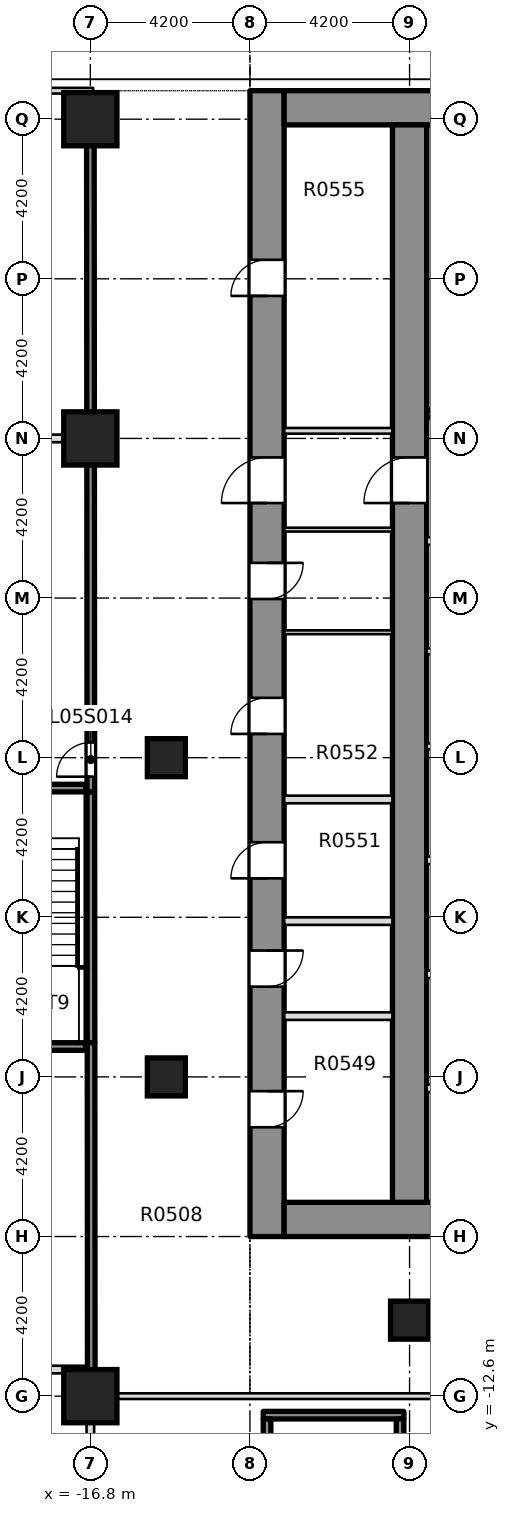
"""IFC4 building model, lengths in metres.
Left out: names, types, materials, properties, quantities, classifications, styles, units other than length and angle.
Written with IfcOpenShell. Run it as: python <this file> out.ifc"""

import sys

from ifc_helpers import new_model, si_unit, direction, frame, frame_2d, origin, origin_2d, place, context, subcontext, project, spatial, rectangle, extrude, element, fill, save


model = new_model("IFC4")
c1 = context("Model", 3, precision=1e-05, world=origin(), true_north=direction((0.0, 1.0)))
c2 = subcontext(c1, "Body", "Model", "MODEL_VIEW")
j1 = project(units=[si_unit("LENGTHUNIT", "METRE"), si_unit("PLANEANGLEUNIT", "RADIAN")], contexts=[c1])
p1 = place(None, origin())
s1 = spatial("IfcSite", under=j1, at=p1, CompositionType="ELEMENT")
p2 = place(p1, origin())
s2 = spatial("IfcBuilding", under=s1, at=p2, CompositionType="ELEMENT")
p3 = place(p2, frame((0.0, 0.0, 30.0)))
s3 = spatial("IfcBuildingStorey", under=s2, at=p3, CompositionType="ELEMENT", Elevation=30.0)
p4 = place(p3, frame((-12.15, -8.4, -0.4), z_axis=(0.0, 0.0, 1.0), x_axis=(0.0, 1.0, 0.0)))
e1 = element("IfcWall", 1, at=p4, inside=s3, PredefinedType="SHEAR", context=c2, shape_type="SweptSolid", body=[
    extrude(rectangle(XDim=30.15, YDim=0.9, at=frame_2d((15.075, 0.0))), origin(), (0.0, 0.0, 1.0), 4.58),
])
p5 = place(p4, frame((2.875, 0.0, 0.4)))
e2 = element("IfcOpeningElement", 2, at=p5, cuts=e1, PredefinedType="OPENING", context=c2, shape_type="SweptSolid", body=[
    extrude(rectangle(XDim=0.95, YDim=2.1, at=frame_2d((0.475, 1.05))), frame((0.0, 0.46, 0.0), z_axis=(0.0, -1.0, 0.0), x_axis=(1.0, 0.0, 0.0)), (0.0, 0.0, 1.0), 0.92),
])
p6 = place(p4, frame((6.575, 0.0, 0.4)))
e3 = element("IfcOpeningElement", 3, at=p6, cuts=e1, PredefinedType="OPENING", context=c2, shape_type="SweptSolid", body=[
    extrude(rectangle(XDim=0.95, YDim=2.1, at=frame_2d((0.475, 1.05))), frame((0.0, 0.46, 0.0), z_axis=(0.0, -1.0, 0.0), x_axis=(1.0, 0.0, 0.0)), (0.0, 0.0, 1.0), 0.92),
])
p7 = place(p4, frame((9.425, 0.0, 0.4)))
e4 = element("IfcOpeningElement", 4, at=p7, cuts=e1, PredefinedType="OPENING", context=c2, shape_type="SweptSolid", body=[
    extrude(rectangle(XDim=0.95, YDim=2.1, at=frame_2d((0.475, 1.05))), frame((0.0, 0.46, 0.0), z_axis=(0.0, -1.0, 0.0), x_axis=(1.0, 0.0, 0.0)), (0.0, 0.0, 1.0), 0.92),
])
p8 = place(p4, frame((13.225, 0.0, 0.4)))
e5 = element("IfcOpeningElement", 5, at=p8, cuts=e1, PredefinedType="OPENING", context=c2, shape_type="SweptSolid", body=[
    extrude(rectangle(XDim=0.95, YDim=2.1, at=frame_2d((0.475, 1.05))), frame((0.0, 0.46, 0.0), z_axis=(0.0, -1.0, 0.0), x_axis=(1.0, 0.0, 0.0)), (0.0, 0.0, 1.0), 0.92),
])
p9 = place(p4, frame((16.775, 0.0, 0.4)))
e6 = element("IfcOpeningElement", 6, at=p9, cuts=e1, PredefinedType="OPENING", context=c2, shape_type="SweptSolid", body=[
    extrude(rectangle(XDim=0.95, YDim=2.1, at=frame_2d((0.475, 1.05))), frame((0.0, 0.46, 0.0), z_axis=(0.0, -1.0, 0.0), x_axis=(1.0, 0.0, 0.0)), (0.0, 0.0, 1.0), 0.92),
])
p10 = place(p4, frame((24.75, 0.0, 0.4)))
e7 = element("IfcOpeningElement", 7, at=p10, cuts=e1, PredefinedType="OPENING", context=c2, shape_type="SweptSolid", body=[
    extrude(rectangle(XDim=0.95, YDim=2.1, at=frame_2d((0.475, 1.05))), frame((0.0, 0.46, 0.0), z_axis=(0.0, -1.0, 0.0), x_axis=(1.0, 0.0, 0.0)), (0.0, 0.0, 1.0), 0.92),
])
p11 = place(p4, frame((19.3, 0.0, 0.4)))
e8 = element("IfcOpeningElement", 8, at=p11, cuts=e1, PredefinedType="OPENING", context=c2, shape_type="SweptSolid", body=[
    extrude(rectangle(XDim=1.2, YDim=2.1, at=frame_2d((0.6, 1.05))), frame((0.0, 0.46, 0.0), z_axis=(0.0, -1.0, 0.0), x_axis=(1.0, 0.0, 0.0)), (0.0, 0.0, 1.0), 0.92),
])
p12 = place(p3, frame((-11.7, -7.95, -0.4), z_axis=(0.0, 0.0, 1.0), x_axis=(1.0, 0.0, 0.0)))
e9 = element("IfcWall", 9, at=p12, inside=s3, PredefinedType="SHEAR", context=c2, shape_type="SweptSolid", body=[
    extrude(rectangle(XDim=23.4, YDim=0.9, at=frame_2d((11.7, 0.0))), origin(), (0.0, 0.0, 1.0), 4.58),
])
p13 = place(p12, frame((6.95, 0.0, 0.4)))
e10 = element("IfcOpeningElement", 10, at=p13, cuts=e9, PredefinedType="OPENING", context=c2, shape_type="SweptSolid", body=[
    extrude(rectangle(XDim=1.8, YDim=2.1, at=frame_2d((0.9, 1.05))), frame((0.0, 0.46, 0.0), z_axis=(0.0, -1.0, 0.0), x_axis=(1.0, 0.0, 0.0)), (0.0, 0.0, 1.0), 0.92),
])
p14 = place(p12, frame((14.65, 0.0, 0.4)))
e11 = element("IfcOpeningElement", 11, at=p14, cuts=e9, PredefinedType="OPENING", context=c2, shape_type="SweptSolid", body=[
    extrude(rectangle(XDim=1.8, YDim=2.1, at=frame_2d((0.9, 1.05))), frame((0.0, 0.46, 0.0), z_axis=(0.0, -1.0, 0.0), x_axis=(1.0, 0.0, 0.0)), (0.0, 0.0, 1.0), 0.92),
])
p15 = place(p3, frame((-11.7, 21.3, -0.4), z_axis=(0.0, 0.0, 1.0), x_axis=(1.0, 0.0, 0.0)))
e12 = element("IfcWall", 12, at=p15, inside=s3, PredefinedType="SOLIDWALL", context=c2, shape_type="SweptSolid", body=[
    extrude(rectangle(XDim=23.4, YDim=0.9, at=frame_2d((11.7, 0.0))), origin(), (0.0, 0.0, 1.0), 4.58),
])
p16 = place(p3, frame((-8.4, -7.5, -0.4), z_axis=(0.0, 0.0, 1.0), x_axis=(0.0, 1.0, 0.0)))
e13 = element("IfcWall", 13, at=p16, inside=s3, PredefinedType="SHEAR", context=c2, shape_type="SweptSolid", body=[
    extrude(rectangle(XDim=28.35, YDim=0.9, at=frame_2d((14.175, 0.0))), origin(), (0.0, 0.0, 1.0), 4.58),
])
p17 = place(p16, frame((18.4, 0.0, 0.4)))
e14 = element("IfcOpeningElement", 14, at=p17, cuts=e13, PredefinedType="OPENING", context=c2, shape_type="SweptSolid", body=[
    extrude(rectangle(XDim=1.2, YDim=2.1, at=frame_2d((0.6, 1.05))), frame((0.0, 0.46, 0.0), z_axis=(0.0, -1.0, 0.0), x_axis=(1.0, 0.0, 0.0)), (0.0, 0.0, 1.0), 0.92),
])
for number, where, z_axis, x_axis in (
    (15, (-16.8, -12.6, -0.4), (0.0, 0.0, 1.0), (1.0, 0.0, 0.0)),
    (16, (-16.8, 12.6, -0.4), (0.0, 0.0, 1.0), (1.0, 0.0, 0.0)),
    (17, (-16.8, 21.0, -0.4), (0.0, 0.0, 1.0), (1.0, 0.0, 0.0)),
):
    element("IfcColumn", number, at=place(p3, frame(where, z_axis=z_axis, x_axis=x_axis)), inside=s3, PredefinedType="COLUMN", context=c2, shape_type="SweptSolid", body=[
        extrude(rectangle(XDim=1.4, YDim=1.4, at=origin_2d()), origin(), (0.0, 0.0, 1.0), 4.58),
    ])
for number, where, z_axis, x_axis in (
    (18, (-8.4, -10.6, -0.4), (0.0, 0.0, 1.0), (1.0, 0.0, 0.0)),
    (19, (-14.8, -4.2, -0.4), (0.0, 0.0, 1.0), (1.0, 0.0, 0.0)),
    (20, (-14.8, 4.2, -0.4), (0.0, 0.0, 1.0), (1.0, 0.0, 0.0)),
):
    element("IfcColumn", number, at=place(p3, frame(where, z_axis=z_axis, x_axis=x_axis)), inside=s3, PredefinedType="COLUMN", context=c2, shape_type="SweptSolid", body=[
        extrude(rectangle(XDim=1.0, YDim=1.0, at=origin_2d()), origin(), (0.0, 0.0, 1.0), 4.58),
    ])
p18 = place(p3, frame((-16.9, -12.6, 0.0), z_axis=(0.0, 0.0, 1.0), x_axis=(1.0, 0.0, 0.0)))
e21 = element("IfcWall", 21, at=p18, inside=s3, PredefinedType="PARTITIONING", context=c2, shape_type="SweptSolid", body=[
    extrude(rectangle(XDim=9.625, YDim=0.15, at=frame_2d((4.812, 0.0))), origin(), (0.0, 0.0, 1.0), 4.18),
])
for number, where, z_axis, x_axis in (
    (22, (-25.75, -11.9, 0.0), (0.0, 0.0, 1.0), (1.0, 0.0, 0.0)),
    (23, (-25.75, 12.6, 0.0), (0.0, 0.0, 1.0), (1.0, 0.0, 0.0)),
):
    element("IfcWall", number, at=place(p3, frame(where, z_axis=z_axis, x_axis=x_axis)), inside=s3, PredefinedType="PARTITIONING", context=c2, shape_type="SweptSolid", body=[
        extrude(rectangle(XDim=8.875, YDim=0.2, at=frame_2d((4.438, 0.0))), origin(), (0.0, 0.0, 1.0), 4.18),
    ])
p19 = place(p3, frame((-25.75, 21.75, 0.0), z_axis=(0.0, 0.0, 1.0), x_axis=(1.0, 0.0, 0.0)))
e24 = element("IfcWall", 24, at=p19, inside=s3, PredefinedType="PARTITIONING", context=c2, shape_type="SweptSolid", body=[
    extrude(rectangle(XDim=9.025, YDim=0.15, at=frame_2d((4.512, 0.0))), origin(), (0.0, 0.0, 1.0), 4.18),
])
p20 = place(p19, frame((1.55, 0.0, 0.0)))
e25 = element("IfcOpeningElement", 25, at=p20, cuts=e24, PredefinedType="OPENING", context=c2, shape_type="SweptSolid", body=[
    extrude(rectangle(XDim=0.9, YDim=2.1, at=frame_2d((0.45, 1.05))), frame((0.0, 0.085, 0.0), z_axis=(0.0, -1.0, 0.0), x_axis=(1.0, 0.0, 0.0)), (0.0, 0.0, 1.0), 0.17),
])
p21 = place(p19, frame((6.025, 0.0, 0.0)))
e26 = element("IfcOpeningElement", 26, at=p21, cuts=e24, PredefinedType="OPENING", context=c2, shape_type="SweptSolid", body=[
    extrude(rectangle(XDim=0.9, YDim=2.1, at=frame_2d((0.45, 1.05))), frame((0.0, 0.085, 0.0), z_axis=(0.0, -1.0, 0.0), x_axis=(1.0, 0.0, 0.0)), (0.0, 0.0, 1.0), 0.17),
])
p22 = place(p3, frame((-16.8, -18.125, 0.0), z_axis=(0.0, 0.0, 1.0), x_axis=(0.0, 1.0, 0.0)))
e27 = element("IfcWall", 27, at=p22, inside=s3, PredefinedType="PARTITIONING", context=c2, shape_type="SweptSolid", body=[
    extrude(rectangle(XDim=5.45, YDim=0.2, at=frame_2d((2.725, 0.0))), origin(), (0.0, 0.0, 1.0), 4.18),
])
p23 = place(p3, frame((-16.782, -3.3, 0.0), z_axis=(0.0, 0.0, 1.0), x_axis=(-0.000739808927, 0.999999726341, 0.0)))
e28 = element("IfcWall", 28, at=p23, inside=s3, PredefinedType="SOLIDWALL", context=c2, shape_type="SweptSolid", body=[
    extrude(rectangle(XDim=6.6, YDim=0.2, at=frame_2d((3.3, 0.0))), origin(), (0.0, 0.0, 1.0), 4.18),
])
for number, where, z_axis, x_axis in (
    (29, (-7.949, -4.5, 0.0), (0.0, 0.0, 1.0), (1.0, 0.0, 0.0)),
    (30, (-7.949, -1.5, 0.0), (0.0, 0.0, 1.0), (1.0, 0.0, 0.0)),
    (31, (-7.949, 1.5, 0.0), (0.0, 0.0, 1.0), (1.0, 0.0, 0.0)),
):
    element("IfcWall", number, at=place(p3, frame(where, z_axis=z_axis, x_axis=x_axis)), inside=s3, PredefinedType="PARTITIONING", context=c2, shape_type="SweptSolid", body=[
        extrude(rectangle(XDim=2.374, YDim=0.2, at=frame_2d((1.187, 0.0))), origin(), (0.0, 0.0, 1.0), 4.18),
    ])
p24 = place(p3, frame((-7.949, 4.5, 0.0), z_axis=(0.0, 0.0, 1.0), x_axis=(1.0, 0.0, 0.0)))
e32 = element("IfcWall", 32, at=p24, inside=s3, PredefinedType="PARTITIONING", context=c2, shape_type="SweptSolid", body=[
    extrude(rectangle(XDim=2.524, YDim=0.15, at=frame_2d((1.262, 0.0))), origin(), (0.0, 0.0, 1.0), 4.18),
])
p25 = place(p3, frame((-7.949, 7.0, 0.0), z_axis=(0.0, 0.0, 1.0), x_axis=(1.0, 0.0, 0.0)))
e33 = element("IfcWall", 33, at=p25, inside=s3, PredefinedType="PARTITIONING", context=c2, shape_type="SweptSolid", body=[
    extrude(rectangle(XDim=15.898, YDim=0.15, at=frame_2d((7.949, 0.0))), origin(), (0.0, 0.0, 1.0), 4.18),
])
p26 = place(p25, frame((7.249, 0.0, 0.0)))
e34 = element("IfcOpeningElement", 34, at=p26, cuts=e33, PredefinedType="OPENING", context=c2, shape_type="SweptSolid", body=[
    extrude(rectangle(XDim=1.4, YDim=2.1, at=frame_2d((0.7, 1.05))), frame((0.0, 0.085, 0.0), z_axis=(0.0, -1.0, 0.0), x_axis=(1.0, 0.0, 0.0)), (0.0, 0.0, 1.0), 0.17),
])
p27 = place(p3, frame((-7.949, 9.9, 0.0), z_axis=(0.0, 0.0, 1.0), x_axis=(1.0, 0.0, 0.0)))
e35 = element("IfcWall", 35, at=p27, inside=s3, PredefinedType="PARTITIONING", context=c2, shape_type="SweptSolid", body=[
    extrude(rectangle(XDim=4.349, YDim=0.2, at=frame_2d((2.174, 0.0))), origin(), (0.0, 0.0, 1.0), 4.18),
])
p28 = place(p27, frame((0.999, 0.0, 0.0)))
e36 = element("IfcOpeningElement", 36, at=p28, cuts=e35, PredefinedType="OPENING", context=c2, shape_type="SweptSolid", body=[
    extrude(rectangle(XDim=1.1, YDim=2.1, at=frame_2d((0.55, 1.05))), frame((0.0, 0.11, 0.0), z_axis=(0.0, -1.0, 0.0), x_axis=(1.0, 0.0, 0.0)), (0.0, 0.0, 1.0), 0.22),
])
p29 = place(p3, frame((-7.949, 13.25, 0.0), z_axis=(0.0, 0.0, 1.0), x_axis=(1.0, 0.0, 0.0)))
e37 = element("IfcWall", 37, at=p29, inside=s3, PredefinedType="SOLIDWALL", context=c2, shape_type="SweptSolid", body=[
    extrude(rectangle(XDim=4.524, YDim=0.2, at=frame_2d((2.262, 0.0))), origin(), (0.0, 0.0, 1.0), 4.18),
])
p30 = place(p29, frame((1.499, 0.0, 0.0)))
e38 = element("IfcOpeningElement", 38, at=p30, cuts=e37, PredefinedType="OPENING", context=c2, shape_type="SweptSolid", body=[
    extrude(rectangle(XDim=1.2, YDim=2.1, at=frame_2d((0.6, 1.05))), frame((0.0, 0.11, 0.0), z_axis=(0.0, -1.0, 0.0), x_axis=(1.0, 0.0, 0.0)), (0.0, 0.0, 1.0), 0.22),
])
for number, where, z_axis, x_axis in (
    (39, (-11.699, -2.6, 0.0), (0.0, 0.0, 1.0), (1.0, 0.0, 0.0)),
    (40, (-11.699, -0.1, 0.0), (0.0, 0.0, 1.0), (1.0, 0.0, 0.0)),
    (41, (-11.699, 3.1, 0.0), (0.0, 0.0, 1.0), (1.0, 0.0, 0.0)),
):
    element("IfcWall", number, at=place(p3, frame(where, z_axis=z_axis, x_axis=x_axis)), inside=s3, PredefinedType="PARTITIONING", context=c2, shape_type="SweptSolid", body=[
        extrude(rectangle(XDim=2.848, YDim=0.2, at=frame_2d((1.424, 0.0))), origin(), (0.0, 0.0, 1.0), 4.18),
    ])
for number, where, z_axis, x_axis in (
    (42, (-11.699, 7.5, 0.0), (0.0, 0.0, 1.0), (1.0, 0.0, 0.0)),
    (43, (-11.699, 10.2, 0.0), (0.0, 0.0, 1.0), (1.0, 0.0, 0.0)),
):
    element("IfcWall", number, at=place(p3, frame(where, z_axis=z_axis, x_axis=x_axis)), inside=s3, PredefinedType="PARTITIONING", context=c2, shape_type="SweptSolid", body=[
        extrude(rectangle(XDim=2.848, YDim=0.1, at=frame_2d((1.424, 0.0))), origin(), (0.0, 0.0, 1.0), 4.18),
    ])
p31 = place(p3, frame((-11.699, 12.8, 0.0), z_axis=(0.0, 0.0, 1.0), x_axis=(1.0, 0.0, 0.0)))
e44 = element("IfcWall", 44, at=p31, inside=s3, PredefinedType="PARTITIONING", context=c2, shape_type="SweptSolid", body=[
    extrude(rectangle(XDim=2.848, YDim=0.15, at=frame_2d((1.424, 0.0))), origin(), (0.0, 0.0, 1.0), 4.18),
])
p32 = place(p3, frame((-12.25, -13.1, 0.0), z_axis=(0.0, 0.0, 1.0), x_axis=(1.0, 0.0, 0.0)))
e45 = element("IfcWall", 45, at=p32, inside=s3, PredefinedType="SOLIDWALL", context=c2, shape_type="SweptSolid", body=[
    extrude(rectangle(XDim=3.7, YDim=0.2, at=frame_2d((1.85, 0.0))), origin(), (0.0, 0.0, 1.0), 4.18),
])
p33 = place(p3, frame((-12.15, -19.8, 0.0), z_axis=(0.0, 0.0, 1.0), x_axis=(0.0, 1.0, 0.0)))
e46 = element("IfcWall", 46, at=p33, inside=s3, PredefinedType="SOLIDWALL", context=c2, shape_type="SweptSolid", body=[
    extrude(rectangle(XDim=6.6, YDim=0.2, at=frame_2d((3.3, 0.0))), origin(), (0.0, 0.0, 1.0), 4.18),
])
p34 = place(p3, frame((-8.65, -20.3, 0.0), z_axis=(0.0, 0.0, 1.0), x_axis=(0.0, 1.0, 0.0)))
e47 = element("IfcWall", 47, at=p34, inside=s3, PredefinedType="SOLIDWALL", context=c2, shape_type="SweptSolid", body=[
    extrude(rectangle(XDim=7.1, YDim=0.2, at=frame_2d((3.55, 0.0))), origin(), (0.0, 0.0, 1.0), 4.18),
])
for number, where, z_axis, x_axis in (
    (48, (-20.45, -3.4, 0.0), (0.0, 0.0, 1.0), (1.0, 0.0, 0.0)),
    (49, (-20.45, 3.4, 0.0), (0.0, 0.0, 1.0), (1.0, 0.0, 0.0)),
):
    element("IfcWall", number, at=place(p3, frame(where, z_axis=z_axis, x_axis=x_axis)), inside=s3, PredefinedType="SOLIDWALL", context=c2, shape_type="SweptSolid", body=[
        extrude(rectangle(XDim=3.525, YDim=0.2, at=frame_2d((1.762, 0.0))), origin(), (0.0, 0.0, 1.0), 4.18),
    ])
p35 = place(p3, frame((-16.775, -12.525, 0.0), z_axis=(0.0, 0.0, 1.0), x_axis=(-0.000714569091, 0.999999744695, 0.0)))
e50 = element("IfcWall", 50, at=p35, inside=s3, PredefinedType="SOLIDWALL", context=c2, shape_type="SweptSolid", body=[
    extrude(rectangle(XDim=9.225, YDim=0.2, at=frame_2d((4.612, 0.0))), origin(), (0.0, 0.0, 1.0), 4.18),
])
p36 = place(p3, frame((-16.787, 3.3, 0.0), z_axis=(0.0, 0.0, 1.0), x_axis=(-0.000729771851, 0.999999733716, 0.0)))
e51 = element("IfcWall", 51, at=p36, inside=s3, PredefinedType="SOLIDWALL", context=c2, shape_type="SweptSolid", body=[
    extrude(rectangle(XDim=18.4, YDim=0.2, at=frame_2d((9.2, 0.0))), origin(), (0.0, 0.0, 1.0), 4.18),
])
p37 = place(p36, frame((0.4, 0.0, 0.0)))
e52 = element("IfcOpeningElement", 52, at=p37, cuts=e51, PredefinedType="OPENING", context=c2, shape_type="SweptSolid", body=[
    extrude(rectangle(XDim=0.9, YDim=2.1, at=frame_2d((0.45, 1.05))), frame((0.0, 0.11, 0.0), z_axis=(0.0, -1.0, 0.0), x_axis=(1.0, 0.0, 0.0)), (0.0, 0.0, 1.0), 0.22),
])
p38 = place(p37, origin())
e53 = element("IfcDoor", 53, at=p38, inside=s3, OperationType="SINGLE_SWING_LEFT", PredefinedType="DOOR", context=c2, shape_type="SweptSolid", body=[
    extrude(rectangle(XDim=0.9, YDim=2.1, at=frame_2d((0.45, 1.05))), frame((0.0, 0.025, 0.0), z_axis=(0.0, -1.0, 0.0), x_axis=(1.0, 0.0, 0.0)), (0.0, 0.0, 1.0), 0.05),
])
fill(e52, e53)
p39 = place(p5, origin())
e54 = element("IfcDoor", 54, at=p39, inside=s3, OperationType="SINGLE_SWING_LEFT", PredefinedType="DOOR", context=c2, shape_type="SweptSolid", body=[
    extrude(rectangle(XDim=0.95, YDim=2.1, at=frame_2d((0.475, 1.05))), frame((0.0, 0.025, 0.0), z_axis=(0.0, -1.0, 0.0), x_axis=(1.0, 0.0, 0.0)), (0.0, 0.0, 1.0), 0.05),
])
fill(e2, e54)
p40 = place(p6, origin())
e55 = element("IfcDoor", 55, at=p40, inside=s3, OperationType="SINGLE_SWING_LEFT", PredefinedType="DOOR", context=c2, shape_type="SweptSolid", body=[
    extrude(rectangle(XDim=0.95, YDim=2.1, at=frame_2d((0.475, 1.05))), frame((0.0, 0.025, 0.0), z_axis=(0.0, -1.0, 0.0), x_axis=(1.0, 0.0, 0.0)), (0.0, 0.0, 1.0), 0.05),
])
fill(e3, e55)
p41 = place(p7, origin())
e56 = element("IfcDoor", 56, at=p41, inside=s3, OperationType="SINGLE_SWING_LEFT", PredefinedType="DOOR", context=c2, shape_type="SweptSolid", body=[
    extrude(rectangle(XDim=0.95, YDim=2.1, at=frame_2d((0.475, 1.05))), frame((0.0, 0.025, 0.0), z_axis=(0.0, -1.0, 0.0), x_axis=(1.0, 0.0, 0.0)), (0.0, 0.0, 1.0), 0.05),
])
fill(e4, e56)
p42 = place(p8, origin())
e57 = element("IfcDoor", 57, at=p42, inside=s3, OperationType="SINGLE_SWING_LEFT", PredefinedType="DOOR", context=c2, shape_type="SweptSolid", body=[
    extrude(rectangle(XDim=0.95, YDim=2.1, at=frame_2d((0.475, 1.05))), frame((0.0, 0.025, 0.0), z_axis=(0.0, -1.0, 0.0), x_axis=(1.0, 0.0, 0.0)), (0.0, 0.0, 1.0), 0.05),
])
fill(e5, e57)
p43 = place(p9, origin())
e58 = element("IfcDoor", 58, at=p43, inside=s3, OperationType="SINGLE_SWING_LEFT", PredefinedType="DOOR", context=c2, shape_type="SweptSolid", body=[
    extrude(rectangle(XDim=0.95, YDim=2.1, at=frame_2d((0.475, 1.05))), frame((0.0, 0.025, 0.0), z_axis=(0.0, -1.0, 0.0), x_axis=(1.0, 0.0, 0.0)), (0.0, 0.0, 1.0), 0.05),
])
fill(e6, e58)
p44 = place(p10, origin())
e59 = element("IfcDoor", 59, at=p44, inside=s3, OperationType="SINGLE_SWING_LEFT", PredefinedType="DOOR", context=c2, shape_type="SweptSolid", body=[
    extrude(rectangle(XDim=0.95, YDim=2.1, at=frame_2d((0.475, 1.05))), frame((0.0, 0.025, 0.0), z_axis=(0.0, -1.0, 0.0), x_axis=(1.0, 0.0, 0.0)), (0.0, 0.0, 1.0), 0.05),
])
fill(e7, e59)
p45 = place(p11, origin())
e60 = element("IfcDoor", 60, at=p45, inside=s3, OperationType="SINGLE_SWING_LEFT", PredefinedType="DOOR", context=c2, shape_type="SweptSolid", body=[
    extrude(rectangle(XDim=1.2, YDim=2.1, at=frame_2d((0.6, 1.05))), frame((0.0, 0.025, 0.0), z_axis=(0.0, -1.0, 0.0), x_axis=(1.0, 0.0, 0.0)), (0.0, 0.0, 1.0), 0.05),
])
fill(e8, e60)
p46 = place(p17, origin())
e61 = element("IfcDoor", 61, at=p46, inside=s3, OperationType="SINGLE_SWING_LEFT", PredefinedType="DOOR", context=c2, shape_type="SweptSolid", body=[
    extrude(rectangle(XDim=1.2, YDim=2.1, at=frame_2d((0.6, 1.05))), frame((0.0, 0.025, 0.0), z_axis=(0.0, -1.0, 0.0), x_axis=(1.0, 0.0, 0.0)), (0.0, 0.0, 1.0), 0.05),
])
fill(e14, e61)
save(model, sys.argv[1])
